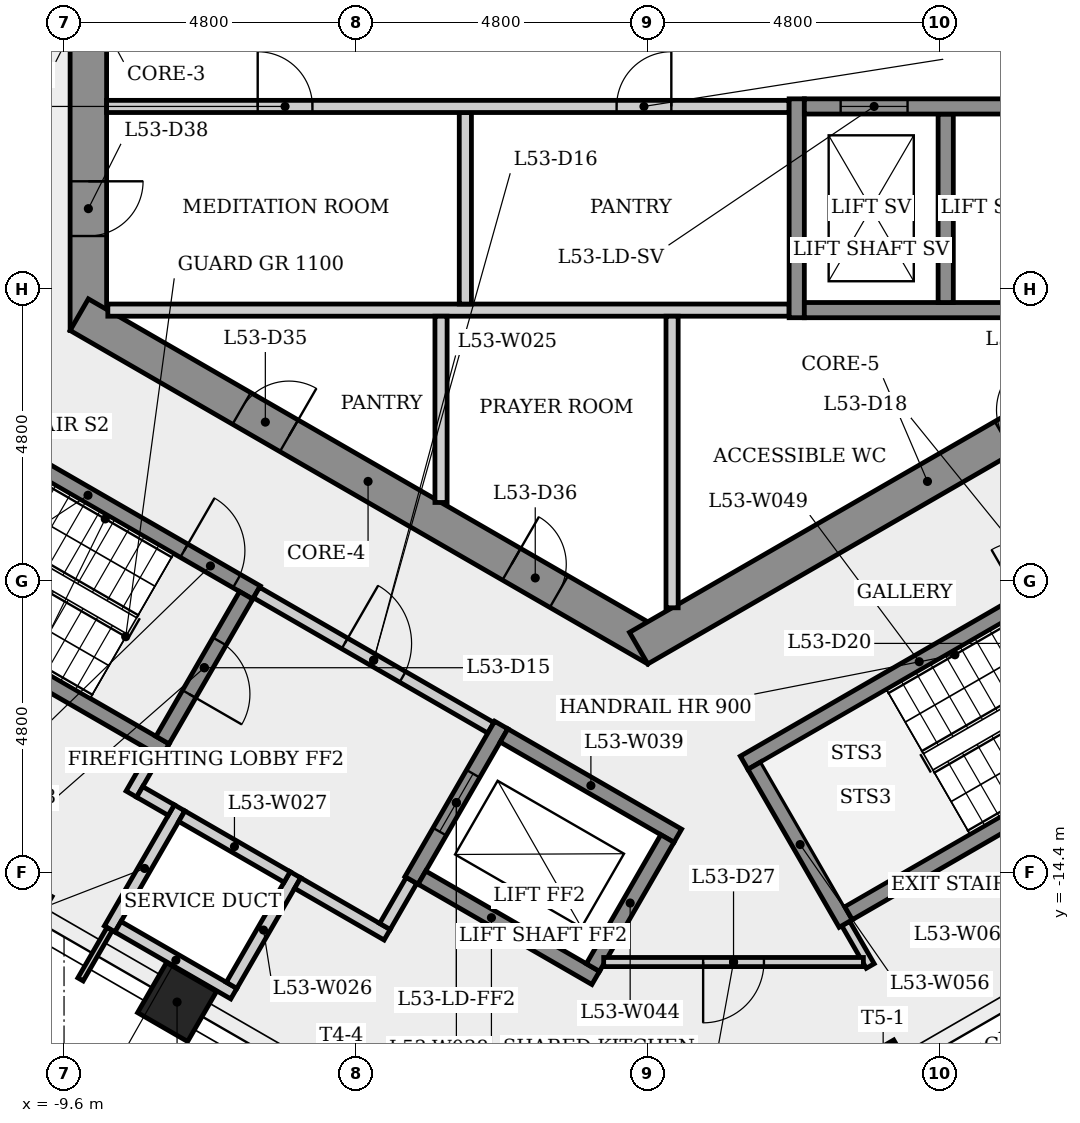
"""IFC4 building model, lengths in metres.
Left out: names, types, materials, properties, quantities, classifications, styles, units other than length and angle.
Written with IfcOpenShell. Run it as: python <this file> out.ifc"""

import sys

from ifc_helpers import new_model, si_unit, direction, frame, frame_2d, origin, origin_2d, place, context, subcontext, project, spatial, rectangle, extrude, element, fill, save


model = new_model("IFC4")
c1 = context("Model", 3, precision=1e-05, world=origin(), true_north=direction((0.0, 1.0)))
c2 = subcontext(c1, "Body", "Model", "MODEL_VIEW")
j1 = project(units=[si_unit("LENGTHUNIT", "METRE"), si_unit("PLANEANGLEUNIT", "RADIAN")], contexts=[c1])
p1 = place(None, origin())
s1 = spatial("IfcSite", under=j1, at=p1, CompositionType="ELEMENT")
p2 = place(p1, origin())
s2 = spatial("IfcBuilding", under=s1, at=p2, CompositionType="ELEMENT")
p3 = place(p2, frame((0.0, 0.0, 198.7)))
s3 = spatial("IfcBuildingStorey", under=s2, at=p3, CompositionType="ELEMENT", Elevation=198.7)
p4 = place(p3, frame((-9.2, 5.485, 0.0), z_axis=(0.0, 0.0, 1.0), x_axis=(0.0, -1.0, 0.0)))
e1 = element("IfcWall", 1, at=p4, inside=s3, PredefinedType="SHEAR", context=c2, shape_type="SweptSolid", body=[
    extrude(rectangle(XDim=10.97, YDim=0.6, at=frame_2d((5.485, 0.0))), origin(), (0.0, 0.0, 1.0), 3.4),
])
p5 = place(p4, frame((8.516, 0.0, 0.0)))
e2 = element("IfcOpeningElement", 2, at=p5, cuts=e1, PredefinedType="OPENING", context=c2, shape_type="SweptSolid", body=[
    extrude(rectangle(XDim=0.9, YDim=2.1, at=frame_2d((0.45, 1.05))), frame((0.0, 0.31, 0.0), z_axis=(0.0, -1.0, 0.0), x_axis=(1.0, 0.0, 0.0)), (0.0, 0.0, 1.0), 0.62),
])
p6 = place(p4, frame((4.685, 0.0, 0.0)))
e3 = element("IfcOpeningElement", 3, at=p6, cuts=e1, PredefinedType="OPENING", context=c2, shape_type="SweptSolid", body=[
    extrude(rectangle(XDim=1.6, YDim=2.1, at=frame_2d((0.8, 1.05))), frame((0.0, 0.31, 0.0), z_axis=(0.0, -1.0, 0.0), x_axis=(1.0, 0.0, 0.0)), (0.0, 0.0, 1.0), 0.62),
])
p7 = place(p3, frame((-9.35, -5.225, 0.0), z_axis=(0.0, 0.0, 1.0), x_axis=(0.866023993627, -0.500002442456, 0.0)))
e4 = element("IfcWall", 4, at=p7, inside=s3, PredefinedType="SHEAR", context=c2, shape_type="SweptSolid", body=[
    extrude(rectangle(XDim=10.97, YDim=0.6, at=frame_2d((5.485, 0.0))), origin(), (0.0, 0.0, 1.0), 3.4),
])
p8 = place(p7, frame((3.084, 0.0, 0.0)))
e5 = element("IfcOpeningElement", 5, at=p8, cuts=e4, PredefinedType="OPENING", context=c2, shape_type="SweptSolid", body=[
    extrude(rectangle(XDim=0.9, YDim=2.1, at=frame_2d((0.45, 1.05))), frame((0.0, 0.31, 0.0), z_axis=(0.0, -1.0, 0.0), x_axis=(1.0, 0.0, 0.0)), (0.0, 0.0, 1.0), 0.62),
])
p9 = place(p7, frame((8.21, 0.0, 0.0)))
e6 = element("IfcOpeningElement", 6, at=p9, cuts=e4, PredefinedType="OPENING", context=c2, shape_type="SweptSolid", body=[
    extrude(rectangle(XDim=0.9, YDim=2.1, at=frame_2d((0.45, 1.05))), frame((0.0, 0.31, 0.0), z_axis=(0.0, -1.0, 0.0), x_axis=(1.0, 0.0, 0.0)), (0.0, 0.0, 1.0), 0.62),
])
p10 = place(p3, frame((-0.15, -10.71, 0.0), z_axis=(0.0, 0.0, 1.0), x_axis=(0.866023993627, 0.500002442456, 0.0)))
e7 = element("IfcWall", 7, at=p10, inside=s3, PredefinedType="SHEAR", context=c2, shape_type="SweptSolid", body=[
    extrude(rectangle(XDim=10.97, YDim=0.6, at=frame_2d((5.485, 0.0))), origin(), (0.0, 0.0, 1.0), 3.4),
])
p11 = place(p10, frame((6.935, 0.0, 0.0)))
e8 = element("IfcOpeningElement", 8, at=p11, cuts=e7, PredefinedType="OPENING", context=c2, shape_type="SweptSolid", body=[
    extrude(rectangle(XDim=0.9, YDim=2.1, at=frame_2d((0.45, 1.05))), frame((0.0, 0.31, 0.0), z_axis=(0.0, -1.0, 0.0), x_axis=(1.0, 0.0, 0.0)), (0.0, 0.0, 1.0), 0.62),
])
for number, where, z_axis, x_axis in (
    (9, (-10.445, -14.969, 0.0), (0.0, 0.0, 1.0), (-0.5, -0.866, 0.0)),
    (10, (-7.741, -16.531, 0.0), (0.0, 0.0, 1.0), (-0.5, -0.866, 0.0)),
    (11, (3.871, -17.803, 0.0), (0.0, 0.0, 1.0), (0.5, -0.866, 0.0)),
):
    element("IfcColumn", number, at=place(p3, frame(where, z_axis=z_axis, x_axis=x_axis)), inside=s3, PredefinedType="COLUMN", context=c2, shape_type="SweptSolid", body=[
        extrude(rectangle(XDim=0.95, YDim=0.95, at=origin_2d()), origin(), (0.0, 0.0, 1.0), 3.4),
    ])
p12 = place(p3, frame((-11.977, -6.595, 0.0), z_axis=(0.0, 0.0, 1.0), x_axis=(0.866025499775, -0.499999833739, 0.0)))
e12 = element("IfcWall", 12, at=p12, inside=s3, PredefinedType="SHEAR", context=c2, shape_type="SweptSolid", body=[
    extrude(rectangle(XDim=6.4, YDim=0.25, at=frame_2d((3.2, 0.0))), origin(), (0.0, 0.0, 1.0), 3.0),
])
p13 = place(p12, frame((5.025, 0.0, 0.0)))
e13 = element("IfcOpeningElement", 13, at=p13, cuts=e12, PredefinedType="OPENING", context=c2, shape_type="SweptSolid", body=[
    extrude(rectangle(XDim=1.0, YDim=2.1, at=frame_2d((0.5, 1.05))), frame((0.0, 0.135, 0.0), z_axis=(0.0, -1.0, 0.0), x_axis=(1.0, 0.0, 0.0)), (0.0, 0.0, 1.0), 0.27),
])
p14 = place(p3, frame((-8.88, -5.15, 0.0), z_axis=(0.0, 0.0, 1.0), x_axis=(1.0, 0.0, 0.0)))
e14 = element("IfcWall", 14, at=p14, inside=s3, PredefinedType="PARTITIONING", context=c2, shape_type="SweptSolid", body=[
    extrude(rectangle(XDim=11.205, YDim=0.2, at=frame_2d((5.603, 0.0))), origin(), (0.0, 0.0, 1.0), 3.0),
])
p15 = place(p3, frame((-8.85, -15.329, 0.0), z_axis=(0.0, 0.0, 1.0), x_axis=(0.500077740698, 0.865980515519, 0.0)))
e15 = element("IfcWall", 15, at=p15, inside=s3, PredefinedType="PLUMBINGWALL", context=c2, shape_type="SweptSolid", body=[
    extrude(rectangle(XDim=2.3, YDim=0.2, at=frame_2d((1.15, 0.0))), origin(), (0.0, 0.0, 1.0), 3.0),
])
p16 = place(p3, frame((-8.85, -15.329, 0.0), z_axis=(0.0, 0.0, 1.0), x_axis=(-0.499950501706, -0.866053979752, 0.0)))
e16 = element("IfcWall", 16, at=p16, inside=s3, PredefinedType="PARTITIONING", context=c2, shape_type="SweptSolid", body=[
    extrude(rectangle(XDim=0.958, YDim=0.1, at=frame_2d((0.479, 0.0))), origin(), (0.0, 0.0, 1.0), 3.0),
])
p17 = place(p3, frame((-8.493, -13.11, 0.0), z_axis=(0.0, 0.0, 1.0), x_axis=(0.500067724834, 0.865986299303, 0.0)))
e17 = element("IfcWall", 17, at=p17, inside=s3, PredefinedType="PARTITIONING", context=c2, shape_type="SweptSolid", body=[
    extrude(rectangle(XDim=0.775, YDim=0.2, at=frame_2d((0.388, 0.0))), origin(), (0.0, 0.0, 1.0), 3.0),
])
p18 = place(p3, frame((-7.935, -12.393, 0.0), z_axis=(0.0, 0.0, 1.0), x_axis=(-0.866025499775, 0.499999833739, 0.0)))
e18 = element("IfcWall", 18, at=p18, inside=s3, PredefinedType="SHEAR", context=c2, shape_type="SweptSolid", body=[
    extrude(rectangle(XDim=6.4, YDim=0.25, at=frame_2d((3.2, 0.0))), origin(), (0.0, 0.0, 1.0), 3.0),
])
p19 = place(p3, frame((-7.836, -13.373, 0.0), z_axis=(0.0, 0.0, 1.0), x_axis=(-0.866232998003, 0.499640263761, 0.0)))
e19 = element("IfcWall", 19, at=p19, inside=s3, PredefinedType="PARTITIONING", context=c2, shape_type="SweptSolid", body=[
    extrude(rectangle(XDim=0.6, YDim=0.2, at=frame_2d((0.3, 0.0))), origin(), (0.0, 0.0, 1.0), 3.0),
])
p20 = place(p3, frame((-6.808, -16.392, 0.0), z_axis=(0.0, 0.0, 1.0), x_axis=(-0.866008176907, 0.50002983664, 0.0)))
e20 = element("IfcWall", 20, at=p20, inside=s3, PredefinedType="PLUMBINGWALL", context=c2, shape_type="SweptSolid", body=[
    extrude(rectangle(XDim=2.2, YDim=0.2, at=frame_2d((1.1, 0.0))), origin(), (0.0, 0.0, 1.0), 3.0),
])
p21 = place(p3, frame((-6.605, -9.841, 0.0), z_axis=(0.0, 0.0, 1.0), x_axis=(-0.499996545922, -0.866027397988, 0.0)))
e21 = element("IfcWall", 21, at=p21, inside=s3, PredefinedType="SHEAR", context=c2, shape_type="SweptSolid", body=[
    extrude(rectangle(XDim=2.75, YDim=0.25, at=frame_2d((1.375, 0.0))), origin(), (0.0, 0.0, 1.0), 3.0),
])
p22 = place(p21, frame((0.875, 0.0, 0.0)))
e22 = element("IfcOpeningElement", 22, at=p22, cuts=e21, PredefinedType="OPENING", context=c2, shape_type="SweptSolid", body=[
    extrude(rectangle(XDim=1.0, YDim=2.1, at=frame_2d((0.5, 1.05))), frame((0.0, 0.135, 0.0), z_axis=(0.0, -1.0, 0.0), x_axis=(1.0, 0.0, 0.0)), (0.0, 0.0, 1.0), 0.27),
])
p23 = place(p3, frame((-6.435, -9.795, 0.0), z_axis=(0.0, 0.0, 1.0), x_axis=(0.866012907634, -0.500021643343, 0.0)))
e23 = element("IfcWall", 23, at=p23, inside=s3, PredefinedType="PARTITIONING", context=c2, shape_type="SweptSolid", body=[
    extrude(rectangle(XDim=4.45, YDim=0.2, at=frame_2d((2.225, 0.0))), origin(), (0.0, 0.0, 1.0), 3.0),
])
p24 = place(p23, frame((1.675, 0.0, 0.0)))
e24 = element("IfcOpeningElement", 24, at=p24, cuts=e23, PredefinedType="OPENING", context=c2, shape_type="SweptSolid", body=[
    extrude(rectangle(XDim=1.1, YDim=2.1, at=frame_2d((0.55, 1.05))), frame((0.0, 0.11, 0.0), z_axis=(0.0, -1.0, 0.0), x_axis=(1.0, 0.0, 0.0)), (0.0, 0.0, 1.0), 0.22),
])
p25 = place(p3, frame((-5.795, -14.437, 0.0), z_axis=(0.0, 0.0, 1.0), x_axis=(-0.500027713859, -0.866009402589, 0.0)))
e25 = element("IfcWall", 25, at=p25, inside=s3, PredefinedType="PLUMBINGWALL", context=c2, shape_type="SweptSolid", body=[
    extrude(rectangle(XDim=2.1, YDim=0.2, at=frame_2d((1.05, 0.0))), origin(), (0.0, 0.0, 1.0), 3.0),
])
p26 = place(p3, frame((-5.931, -14.473, 0.0), z_axis=(0.0, 0.0, 1.0), x_axis=(-0.866041268327, 0.499972520799, 0.0)))
e26 = element("IfcWall", 26, at=p26, inside=s3, PredefinedType="PLUMBINGWALL", context=c2, shape_type="SweptSolid", body=[
    extrude(rectangle(XDim=2.0, YDim=0.2, at=frame_2d((1.0, 0.0))), origin(), (0.0, 0.0, 1.0), 3.0),
])
p27 = place(p3, frame((-4.286, -15.423, 0.0), z_axis=(0.0, 0.0, 1.0), x_axis=(-0.866025371046, 0.500000056704, 0.0)))
e27 = element("IfcWall", 27, at=p27, inside=s3, PredefinedType="PARTITIONING", context=c2, shape_type="SweptSolid", body=[
    extrude(rectangle(XDim=1.7, YDim=0.2, at=frame_2d((0.85, 0.0))), origin(), (0.0, 0.0, 1.0), 3.0),
])
p28 = place(p3, frame((-3.885, -14.529, 0.0), z_axis=(0.0, 0.0, 1.0), x_axis=(-0.499859285417, -0.866106630146, 0.0)))
e28 = element("IfcWall", 28, at=p28, inside=s3, PredefinedType="PARTITIONING", context=c2, shape_type="SweptSolid", body=[
    extrude(rectangle(XDim=0.875, YDim=0.2, at=frame_2d((0.438, 0.0))), origin(), (0.0, 0.0, 1.0), 3.0),
])
p29 = place(p3, frame((-3.4, -5.25, 0.0), z_axis=(0.0, 0.0, 1.0), x_axis=(0.0, -1.0, 0.0)))
e29 = element("IfcWall", 29, at=p29, inside=s3, PredefinedType="PARTITIONING", context=c2, shape_type="SweptSolid", body=[
    extrude(rectangle(XDim=3.064, YDim=0.2, at=frame_2d((1.532, 0.0))), origin(), (0.0, 0.0, 1.0), 3.0),
])
p30 = place(p3, frame((-3.0, -1.9, 0.0), z_axis=(0.0, 0.0, 1.0), x_axis=(0.0, -1.0, 0.0)))
e30 = element("IfcWall", 30, at=p30, inside=s3, PredefinedType="PARTITIONING", context=c2, shape_type="SweptSolid", body=[
    extrude(rectangle(XDim=3.15, YDim=0.2, at=frame_2d((1.575, 0.0))), origin(), (0.0, 0.0, 1.0), 3.0),
])
p31 = place(p3, frame((-8.9, -1.8, 0.0), z_axis=(0.0, 0.0, 1.0), x_axis=(1.0, 0.0, 0.0)))
e31 = element("IfcWall", 31, at=p31, inside=s3, PredefinedType="PARTITIONING", context=c2, shape_type="SweptSolid", body=[
    extrude(rectangle(XDim=11.225, YDim=0.2, at=frame_2d((5.613, 0.0))), origin(), (0.0, 0.0, 1.0), 3.0),
])
p32 = place(p31, frame((2.485, 0.0, 0.0)))
e32 = element("IfcOpeningElement", 32, at=p32, cuts=e31, PredefinedType="OPENING", context=c2, shape_type="SweptSolid", body=[
    extrude(rectangle(XDim=0.9, YDim=2.1, at=frame_2d((0.45, 1.05))), frame((0.0, 0.11, 0.0), z_axis=(0.0, -1.0, 0.0), x_axis=(1.0, 0.0, 0.0)), (0.0, 0.0, 1.0), 0.22),
])
p33 = place(p31, frame((8.387, 0.0, 0.0)))
e33 = element("IfcOpeningElement", 33, at=p33, cuts=e31, PredefinedType="OPENING", context=c2, shape_type="SweptSolid", body=[
    extrude(rectangle(XDim=0.9, YDim=2.1, at=frame_2d((0.45, 1.05))), frame((0.0, 0.11, 0.0), z_axis=(0.0, -1.0, 0.0), x_axis=(1.0, 0.0, 0.0)), (0.0, 0.0, 1.0), 0.22),
])
p34 = place(p3, frame((-2.41, -11.974, 0.0), z_axis=(0.0, 0.0, 1.0), x_axis=(-0.500001826776, -0.866024349092, 0.0)))
e34 = element("IfcWall", 34, at=p34, inside=s3, PredefinedType="SHEAR", context=c2, shape_type="SweptSolid", body=[
    extrude(rectangle(XDim=2.95, YDim=0.25, at=frame_2d((1.475, 0.0))), origin(), (0.0, 0.0, 1.0), 3.0),
])
p35 = place(p34, frame((0.925, 0.0, 0.0)))
e35 = element("IfcOpeningElement", 35, at=p35, cuts=e34, PredefinedType="OPENING", context=c2, shape_type="SweptSolid", body=[
    extrude(rectangle(XDim=1.1, YDim=2.1, at=frame_2d((0.55, 1.05))), frame((0.0, 0.135, 0.0), z_axis=(0.0, -1.0, 0.0), x_axis=(1.0, 0.0, 0.0)), (0.0, 0.0, 1.0), 0.27),
])
p36 = place(p3, frame((-2.364, -12.145, 0.0), z_axis=(0.0, 0.0, 1.0), x_axis=(0.866040211805, -0.499974350878, 0.0)))
e36 = element("IfcWall", 36, at=p36, inside=s3, PredefinedType="SHEAR", context=c2, shape_type="SweptSolid", body=[
    extrude(rectangle(XDim=3.3, YDim=0.25, at=frame_2d((1.65, 0.0))), origin(), (0.0, 0.0, 1.0), 3.0),
])
p37 = place(p3, frame((-0.856, -16.133, 0.0), z_axis=(0.0, 0.0, 1.0), x_axis=(-0.866021716278, 0.500006386895, 0.0)))
e37 = element("IfcWall", 37, at=p37, inside=s3, PredefinedType="SHEAR", context=c2, shape_type="SweptSolid", body=[
    extrude(rectangle(XDim=3.3, YDim=0.25, at=frame_2d((1.65, 0.0))), origin(), (0.0, 0.0, 1.0), 3.0),
])
p38 = place(p3, frame((-0.902, -15.962, 0.0), z_axis=(0.0, 0.0, 1.0), x_axis=(0.500061746146, 0.865989751695, 0.0)))
e38 = element("IfcWall", 38, at=p38, inside=s3, PredefinedType="SHEAR", context=c2, shape_type="SweptSolid", body=[
    extrude(rectangle(XDim=2.45, YDim=0.25, at=frame_2d((1.225, 0.0))), origin(), (0.0, 0.0, 1.0), 3.4),
])
p39 = place(p3, frame((0.4, -5.25, 0.0), z_axis=(0.0, 0.0, 1.0), x_axis=(0.0, -1.0, 0.0)))
e39 = element("IfcWall", 39, at=p39, inside=s3, PredefinedType="PARTITIONING", context=c2, shape_type="SweptSolid", body=[
    extrude(rectangle(XDim=4.796, YDim=0.2, at=frame_2d((2.398, 0.0))), origin(), (0.0, 0.0, 1.0), 3.0),
])
p40 = place(p3, frame((1.585, -12.595, 0.0), z_axis=(0.0, 0.0, 1.0), x_axis=(0.866036417653, 0.499980922934, 0.0)))
e40 = element("IfcWall", 40, at=p40, inside=s3, PredefinedType="SHEAR", context=c2, shape_type="SweptSolid", body=[
    extrude(rectangle(XDim=6.65, YDim=0.25, at=frame_2d((3.325, 0.0))), origin(), (0.0, 0.0, 1.0), 3.0),
])
p41 = place(p40, frame((5.275, 0.0, 0.0)))
e41 = element("IfcOpeningElement", 41, at=p41, cuts=e40, PredefinedType="OPENING", context=c2, shape_type="SweptSolid", body=[
    extrude(rectangle(XDim=1.0, YDim=2.1, at=frame_2d((0.5, 1.05))), frame((0.0, 0.135, 0.0), z_axis=(0.0, -1.0, 0.0), x_axis=(1.0, 0.0, 0.0)), (0.0, 0.0, 1.0), 0.27),
])
p42 = place(p3, frame((2.45, -5.275, 0.0), z_axis=(0.0, 0.0, 1.0), x_axis=(0.0, 1.0, 0.0)))
e42 = element("IfcWall", 42, at=p42, inside=s3, PredefinedType="SHEAR", context=c2, shape_type="SweptSolid", body=[
    extrude(rectangle(XDim=3.6, YDim=0.25, at=frame_2d((1.8, 0.0))), origin(), (0.0, 0.0, 1.0), 3.0),
])
p43 = place(p3, frame((3.256, -15.239, 0.0), z_axis=(0.0, 0.0, 1.0), x_axis=(0.499818546685, -0.866130140562, 0.0)))
e43 = element("IfcWall", 43, at=p43, inside=s3, PredefinedType="PARTITIONING", context=c2, shape_type="SweptSolid", body=[
    extrude(rectangle(XDim=0.806, YDim=0.15, at=frame_2d((0.403, 0.0))), origin(), (0.0, 0.0, 1.0), 3.0),
])
p44 = place(p3, frame((3.256, -15.239, 0.0), z_axis=(0.0, 0.0, 1.0), x_axis=(-0.50002537861, 0.866010750942, 0.0)))
e44 = element("IfcWall", 44, at=p44, inside=s3, PredefinedType="SHEAR", context=c2, shape_type="SweptSolid", body=[
    extrude(rectangle(XDim=3.0, YDim=0.25, at=frame_2d((1.5, 0.0))), origin(), (0.0, 0.0, 1.0), 3.0),
])
p45 = place(p3, frame((3.546, -15.872, 0.0), z_axis=(0.0, 0.0, 1.0), x_axis=(-1.0, 0.0, 0.0)))
e45 = element("IfcWall", 45, at=p45, inside=s3, PredefinedType="PARTITIONING", context=c2, shape_type="SweptSolid", body=[
    extrude(rectangle(XDim=4.271, YDim=0.15, at=frame_2d((2.136, 0.0))), origin(), (0.0, 0.0, 1.0), 3.0),
])
p46 = place(p45, frame((1.636, 0.0, 0.0)))
e46 = element("IfcOpeningElement", 46, at=p46, cuts=e45, PredefinedType="OPENING", context=c2, shape_type="SweptSolid", body=[
    extrude(rectangle(XDim=1.0, YDim=2.1, at=frame_2d((0.5, 1.05))), frame((0.0, 0.085, 0.0), z_axis=(0.0, -1.0, 0.0), x_axis=(1.0, 0.0, 0.0)), (0.0, 0.0, 1.0), 0.17),
])
p47 = place(p3, frame((2.575, -5.15, 0.0), z_axis=(0.0, 0.0, 1.0), x_axis=(1.0, 0.0, 0.0)))
e47 = element("IfcWall", 47, at=p47, inside=s3, PredefinedType="SHEAR", context=c2, shape_type="SweptSolid", body=[
    extrude(rectangle(XDim=4.9, YDim=0.25, at=frame_2d((2.45, 0.0))), origin(), (0.0, 0.0, 1.0), 3.0),
])
p48 = place(p3, frame((4.9, -1.925, 0.0), z_axis=(0.0, 0.0, 1.0), x_axis=(0.0, -1.0, 0.0)))
e48 = element("IfcWall", 48, at=p48, inside=s3, PredefinedType="SHEAR", context=c2, shape_type="SweptSolid", body=[
    extrude(rectangle(XDim=3.1, YDim=0.25, at=frame_2d((1.55, 0.0))), origin(), (0.0, 0.0, 1.0), 3.4),
])
p49 = place(p3, frame((2.575, -1.8, 0.0), z_axis=(0.0, 0.0, 1.0), x_axis=(1.0, 0.0, 0.0)))
e49 = element("IfcWall", 49, at=p49, inside=s3, PredefinedType="SHEAR", context=c2, shape_type="SweptSolid", body=[
    extrude(rectangle(XDim=4.9, YDim=0.25, at=frame_2d((2.45, 0.0))), origin(), (0.0, 0.0, 1.0), 3.0),
])
p50 = place(p49, frame((0.597, 0.0, 0.0)))
e50 = element("IfcOpeningElement", 50, at=p50, cuts=e49, PredefinedType="OPENING", context=c2, shape_type="SweptSolid", body=[
    extrude(rectangle(XDim=1.1, YDim=2.1, at=frame_2d((0.55, 1.05))), frame((0.0, 0.135, 0.0), z_axis=(0.0, -1.0, 0.0), x_axis=(1.0, 0.0, 0.0)), (0.0, 0.0, 1.0), 0.27),
])
p51 = place(p3, frame((3.301, -15.068, 0.0), z_axis=(0.0, 0.0, 1.0), x_axis=(0.866035036182, 0.499983315828, 0.0)))
e51 = element("IfcWall", 51, at=p51, inside=s3, PredefinedType="SHEAR", context=c2, shape_type="SweptSolid", body=[
    extrude(rectangle(XDim=6.4, YDim=0.25, at=frame_2d((3.2, 0.0))), origin(), (0.0, 0.0, 1.0), 3.0),
])
p52 = place(p50, origin())
e52 = element("IfcDoor", 52, at=p52, inside=s3, OperationType="SLIDING_TO_LEFT", PredefinedType="DOOR", context=c2, shape_type="SweptSolid", body=[
    extrude(rectangle(XDim=1.1, YDim=2.1, at=frame_2d((0.55, 1.05))), frame((0.0, 0.025, 0.0), z_axis=(0.0, -1.0, 0.0), x_axis=(1.0, 0.0, 0.0)), (0.0, 0.0, 1.0), 0.05),
])
fill(e50, e52)
p53 = place(p32, origin())
e53 = element("IfcDoor", 53, at=p53, inside=s3, OperationType="SINGLE_SWING_LEFT", PredefinedType="DOOR", context=c2, shape_type="SweptSolid", body=[
    extrude(rectangle(XDim=0.9, YDim=2.1, at=frame_2d((0.45, 1.05))), frame((0.0, 0.025, 0.0), z_axis=(0.0, -1.0, 0.0), x_axis=(1.0, 0.0, 0.0)), (0.0, 0.0, 1.0), 0.05),
])
fill(e32, e53)
p54 = place(p33, origin())
e54 = element("IfcDoor", 54, at=p54, inside=s3, OperationType="SINGLE_SWING_RIGHT", PredefinedType="DOOR", context=c2, shape_type="SweptSolid", body=[
    extrude(rectangle(XDim=0.9, YDim=2.1, at=frame_2d((0.45, 1.05))), frame((0.0, 0.025, 0.0), z_axis=(0.0, -1.0, 0.0), x_axis=(1.0, 0.0, 0.0)), (0.0, 0.0, 1.0), 0.05),
])
fill(e33, e54)
p55 = place(p13, origin())
e55 = element("IfcDoor", 55, at=p55, inside=s3, OperationType="SINGLE_SWING_LEFT", PredefinedType="DOOR", context=c2, shape_type="SweptSolid", body=[
    extrude(rectangle(XDim=1.0, YDim=2.1, at=frame_2d((0.5, 1.05))), frame((0.0, 0.025, 0.0), z_axis=(0.0, -1.0, 0.0), x_axis=(1.0, 0.0, 0.0)), (0.0, 0.0, 1.0), 0.05),
])
fill(e13, e55)
p56 = place(p22, origin())
e56 = element("IfcDoor", 56, at=p56, inside=s3, OperationType="SINGLE_SWING_RIGHT", PredefinedType="DOOR", context=c2, shape_type="SweptSolid", body=[
    extrude(rectangle(XDim=1.0, YDim=2.1, at=frame_2d((0.5, 1.05))), frame((0.0, 0.025, 0.0), z_axis=(0.0, -1.0, 0.0), x_axis=(1.0, 0.0, 0.0)), (0.0, 0.0, 1.0), 0.05),
])
fill(e22, e56)
p57 = place(p24, origin())
e57 = element("IfcDoor", 57, at=p57, inside=s3, OperationType="SINGLE_SWING_LEFT", PredefinedType="DOOR", context=c2, shape_type="SweptSolid", body=[
    extrude(rectangle(XDim=1.1, YDim=2.1, at=frame_2d((0.55, 1.05))), frame((0.0, 0.025, 0.0), z_axis=(0.0, -1.0, 0.0), x_axis=(1.0, 0.0, 0.0)), (0.0, 0.0, 1.0), 0.05),
])
fill(e24, e57)
p58 = place(p35, origin())
e58 = element("IfcDoor", 58, at=p58, inside=s3, OperationType="SLIDING_TO_LEFT", PredefinedType="DOOR", context=c2, shape_type="SweptSolid", body=[
    extrude(rectangle(XDim=1.1, YDim=2.1, at=frame_2d((0.55, 1.05))), frame((0.0, 0.025, 0.0), z_axis=(0.0, -1.0, 0.0), x_axis=(1.0, 0.0, 0.0)), (0.0, 0.0, 1.0), 0.05),
])
fill(e35, e58)
p59 = place(p46, origin())
e59 = element("IfcDoor", 59, at=p59, inside=s3, OperationType="SINGLE_SWING_RIGHT", PredefinedType="DOOR", context=c2, shape_type="SweptSolid", body=[
    extrude(rectangle(XDim=1.0, YDim=2.1, at=frame_2d((0.5, 1.05))), frame((0.0, 0.025, 0.0), z_axis=(0.0, -1.0, 0.0), x_axis=(1.0, 0.0, 0.0)), (0.0, 0.0, 1.0), 0.05),
])
fill(e46, e59)
p60 = place(p8, origin())
e60 = element("IfcDoor", 60, at=p60, inside=s3, OperationType="SINGLE_SWING_RIGHT", PredefinedType="DOOR", context=c2, shape_type="SweptSolid", body=[
    extrude(rectangle(XDim=0.9, YDim=2.1, at=frame_2d((0.45, 1.05))), frame((0.0, 0.025, 0.0), z_axis=(0.0, -1.0, 0.0), x_axis=(1.0, 0.0, 0.0)), (0.0, 0.0, 1.0), 0.05),
])
fill(e5, e60)
p61 = place(p9, origin())
e61 = element("IfcDoor", 61, at=p61, inside=s3, OperationType="SINGLE_SWING_LEFT", PredefinedType="DOOR", context=c2, shape_type="SweptSolid", body=[
    extrude(rectangle(XDim=0.9, YDim=2.1, at=frame_2d((0.45, 1.05))), frame((0.0, 0.025, 0.0), z_axis=(0.0, -1.0, 0.0), x_axis=(1.0, 0.0, 0.0)), (0.0, 0.0, 1.0), 0.05),
])
fill(e6, e61)
p62 = place(p5, origin())
e62 = element("IfcDoor", 62, at=p62, inside=s3, OperationType="SINGLE_SWING_LEFT", PredefinedType="DOOR", context=c2, shape_type="SweptSolid", body=[
    extrude(rectangle(XDim=0.9, YDim=2.1, at=frame_2d((0.45, 1.05))), frame((0.0, 0.025, 0.0), z_axis=(0.0, -1.0, 0.0), x_axis=(1.0, 0.0, 0.0)), (0.0, 0.0, 1.0), 0.05),
])
fill(e2, e62)
save(model, sys.argv[1])
